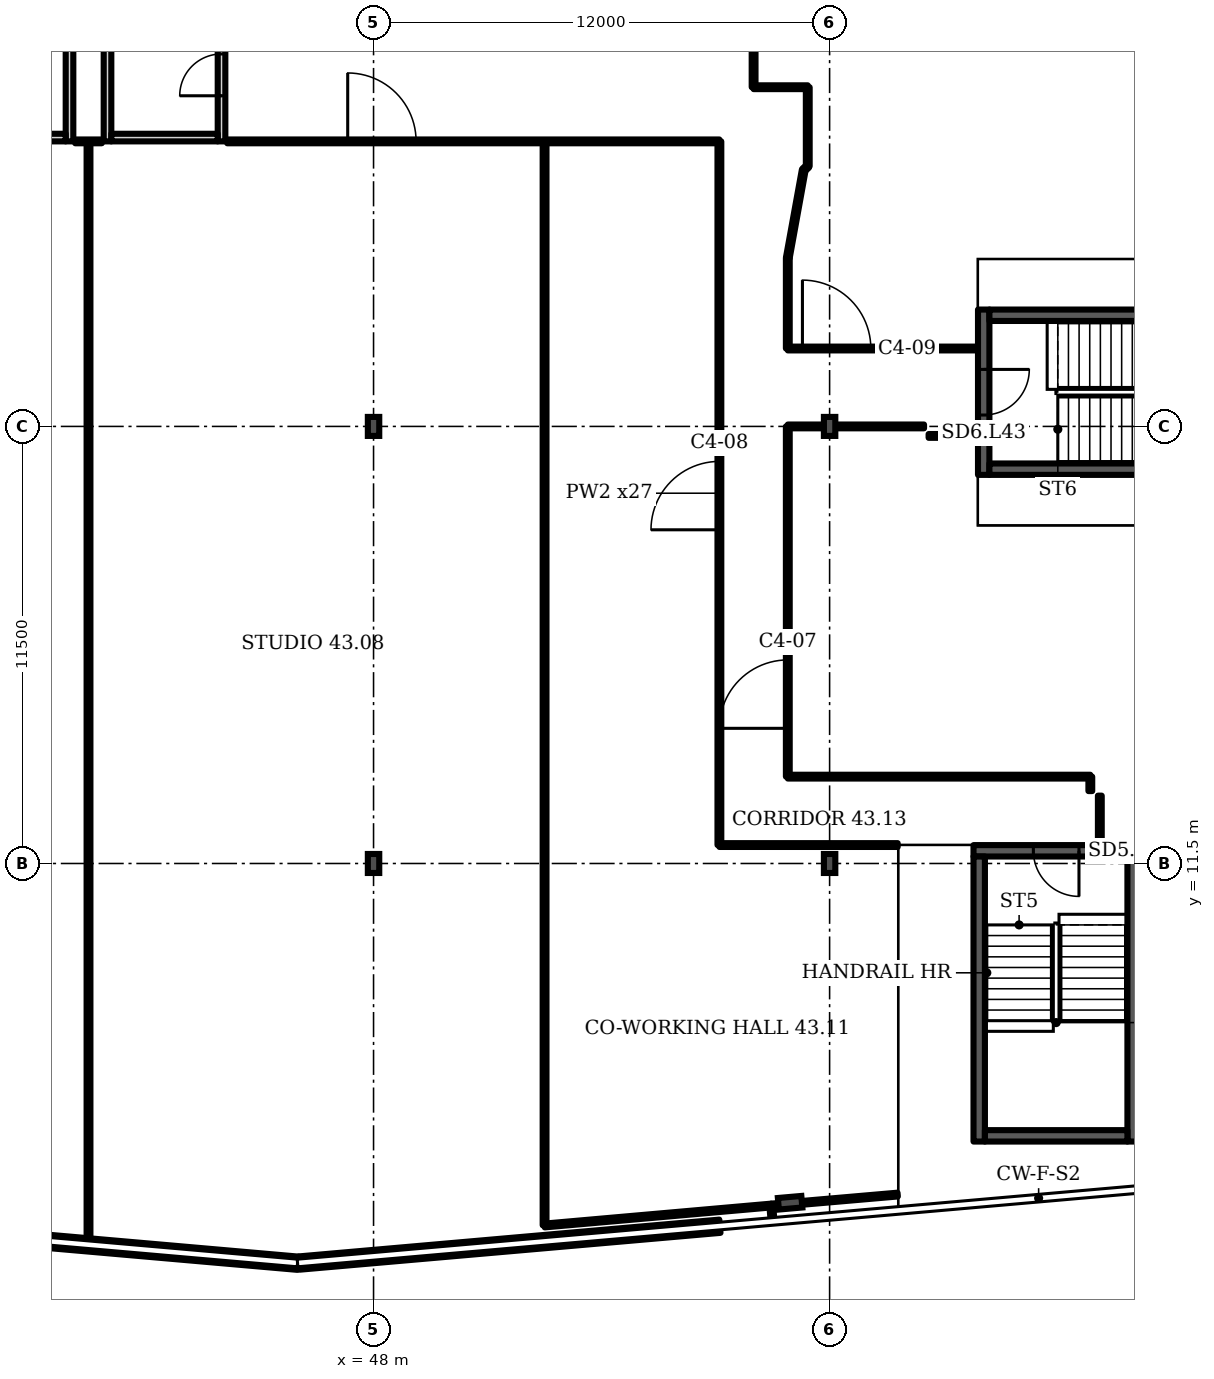
"""IFC4 building model, lengths in metres.
Left out: names, types, materials, properties, quantities, classifications, styles, units other than length and angle.
Written with IfcOpenShell. Run it as: python <this file> out.ifc"""

import sys

from ifc_helpers import new_model, si_unit, direction, frame, frame_2d, origin, origin_2d, place, context, subcontext, project, spatial, rectangle, i_section, extrude, element, fill, save


model = new_model("IFC4")
c1 = context("Model", 3, precision=1e-05, world=origin(), true_north=direction((0.0, 1.0)))
c2 = subcontext(c1, "Body", "Model", "MODEL_VIEW")
j1 = project(units=[si_unit("LENGTHUNIT", "METRE"), si_unit("PLANEANGLEUNIT", "RADIAN")], contexts=[c1])
p1 = place(None, origin())
s1 = spatial("IfcSite", under=j1, at=p1, CompositionType="ELEMENT")
p2 = place(p1, origin())
s2 = spatial("IfcBuilding", under=s1, at=p2, CompositionType="ELEMENT")
p3 = place(p2, frame((0.0, 0.0, 177.1)))
s3 = spatial("IfcBuildingStorey", under=s2, at=p3, CompositionType="ELEMENT", Elevation=177.1)
p4 = place(p3, frame((58.961, 2.573, 0.0), z_axis=(0.0, 0.0, 1.0), x_axis=(0.087156, -0.996198, 0.0)))
e1 = element("IfcColumn", 1, at=p4, inside=s3, PredefinedType="COLUMN", context=c2, shape_type="SweptSolid", body=[
    extrude(i_section(OverallWidth=0.305, OverallDepth=0.62, WebThickness=0.021, FlangeThickness=0.04, FilletRadius=0.027, at=origin_2d()), origin(), (0.0, 0.0, 1.0), 3.6),
])
for number, where, z_axis, x_axis in (
    (2, (48.0, 11.5, 0.0), (0.0, 0.0, 1.0), (1.0, 0.0, 0.0)),
    (3, (60.0, 11.5, 0.0), (0.0, 0.0, 1.0), (1.0, 0.0, 0.0)),
    (4, (48.0, 23.0, 0.0), (0.0, 0.0, 1.0), (1.0, 0.0, 0.0)),
    (5, (60.0, 23.0, 0.0), (0.0, 0.0, 1.0), (1.0, 0.0, 0.0)),
):
    element("IfcColumn", number, at=place(p3, frame(where, z_axis=z_axis, x_axis=x_axis)), inside=s3, PredefinedType="COLUMN", context=c2, shape_type="SweptSolid", body=[
        extrude(i_section(OverallWidth=0.3, OverallDepth=0.5, WebThickness=0.014, FlangeThickness=0.028, FilletRadius=0.027, at=origin_2d()), origin(), (0.0, 0.0, 1.0), 3.6),
    ])
p5 = place(p3, frame((35.03, 1.943, 0.0), z_axis=(0.0, 0.0, 1.0), x_axis=(0.996199, -0.08714, 0.0)))
e6 = element("IfcWall", 6, at=p5, inside=s3, PredefinedType="SOLIDWALL", context=c2, shape_type="SweptSolid", body=[
    extrude(rectangle(XDim=11.028, YDim=0.35, at=frame_2d((5.514, 0.0))), origin(), (0.0, 0.0, 1.0), 1.0),
])
p6 = place(p3, frame((46.045, 0.987, 0.0), z_axis=(0.0, 0.0, 1.0), x_axis=(0.996193, 0.087171, 0.0)))
e7 = element("IfcWall", 7, at=p6, inside=s3, PredefinedType="SOLIDWALL", context=c2, shape_type="SweptSolid", body=[
    extrude(rectangle(XDim=11.11, YDim=0.35, at=frame_2d((5.555, 0.0))), origin(), (0.0, 0.0, 1.0), 1.0),
])
p7 = place(p3, frame((40.0, 30.5, 0.0), z_axis=(0.0, 0.0, 1.0), x_axis=(0.0, 1.0, 0.0)))
e8 = element("IfcWall", 8, at=p7, inside=s3, PredefinedType="PARTITIONING", context=c2, shape_type="SweptSolid", body=[
    extrude(rectangle(XDim=3.5, YDim=0.2, at=frame_2d((1.75, 0.0))), origin(), (0.0, 0.0, 1.0), 3.2),
])
p8 = place(p3, frame((37.1, 30.6, 0.0), z_axis=(0.0, 0.0, 1.0), x_axis=(1.0, 0.0, 0.0)))
e9 = element("IfcWall", 9, at=p8, inside=s3, PredefinedType="PARTITIONING", context=c2, shape_type="SweptSolid", body=[
    extrude(rectangle(XDim=2.8, YDim=0.2, at=frame_2d((1.4, 0.0))), origin(), (0.0, 0.0, 1.0), 3.2),
])
p9 = place(p3, frame((41.0, 30.5, 0.0), z_axis=(0.0, 0.0, 1.0), x_axis=(0.0, 1.0, 0.0)))
e10 = element("IfcWall", 10, at=p9, inside=s3, PredefinedType="PARTITIONING", context=c2, shape_type="SweptSolid", body=[
    extrude(rectangle(XDim=3.5, YDim=0.2, at=frame_2d((1.75, 0.0))), origin(), (0.0, 0.0, 1.0), 3.2),
])
p10 = place(p3, frame((44.0, 30.5, 0.0), z_axis=(0.0, 0.0, 1.0), x_axis=(0.0, 1.0, 0.0)))
e11 = element("IfcWall", 11, at=p10, inside=s3, PredefinedType="PARTITIONING", context=c2, shape_type="SweptSolid", body=[
    extrude(rectangle(XDim=3.5, YDim=0.2, at=frame_2d((1.75, 0.0))), origin(), (0.0, 0.0, 1.0), 3.2),
])
p11 = place(p10, frame((1.2, 0.0, 0.0)))
e12 = element("IfcOpeningElement", 12, at=p11, cuts=e11, PredefinedType="OPENING", context=c2, shape_type="SweptSolid", body=[
    extrude(rectangle(XDim=1.1, YDim=2.1, at=frame_2d((0.55, 1.05))), frame((0.0, 0.11, 0.0), z_axis=(0.0, -1.0, 0.0), x_axis=(1.0, 0.0, 0.0)), (0.0, 0.0, 1.0), 0.22),
])
p12 = place(p3, frame((41.1, 30.6, 0.0), z_axis=(0.0, 0.0, 1.0), x_axis=(1.0, 0.0, 0.0)))
e13 = element("IfcWall", 13, at=p12, inside=s3, PredefinedType="PARTITIONING", context=c2, shape_type="SweptSolid", body=[
    extrude(rectangle(XDim=2.8, YDim=0.2, at=frame_2d((1.4, 0.0))), origin(), (0.0, 0.0, 1.0), 3.2),
])
p13 = place(p3, frame((63.786, 11.834, 0.0), z_axis=(0.0, 0.0, 1.0), x_axis=(1.0, 0.0, 0.0)))
e14 = element("IfcWall", 14, at=p13, inside=s3, PredefinedType="SHEAR", context=c2, shape_type="SweptSolid", body=[
    extrude(rectangle(XDim=4.35, YDim=0.3, at=frame_2d((2.175, 0.0))), origin(), (0.0, 0.0, 1.0), 3.2),
])
p14 = place(p13, frame((1.575, 0.0, 0.0)))
e15 = element("IfcOpeningElement", 15, at=p14, cuts=e14, PredefinedType="OPENING", context=c2, shape_type="SweptSolid", body=[
    extrude(rectangle(XDim=1.2, YDim=2.1, at=frame_2d((0.6, 1.05))), frame((0.0, 0.16, 0.0), z_axis=(0.0, -1.0, 0.0), x_axis=(1.0, 0.0, 0.0)), (0.0, 0.0, 1.0), 0.32),
])
p15 = place(p3, frame((64.055, 21.725, 0.0), z_axis=(0.0, 0.0, 1.0), x_axis=(0.0, 1.0, 0.0)))
e16 = element("IfcWall", 16, at=p15, inside=s3, PredefinedType="SHEAR", context=c2, shape_type="SweptSolid", body=[
    extrude(rectangle(XDim=4.35, YDim=0.3, at=frame_2d((2.175, 0.0))), origin(), (0.0, 0.0, 1.0), 3.2),
])
p16 = place(p15, frame((1.575, 0.0, 0.0)))
e17 = element("IfcOpeningElement", 17, at=p16, cuts=e16, PredefinedType="OPENING", context=c2, shape_type="SweptSolid", body=[
    extrude(rectangle(XDim=1.2, YDim=2.1, at=frame_2d((0.6, 1.05))), frame((0.0, 0.16, 0.0), z_axis=(0.0, -1.0, 0.0), x_axis=(1.0, 0.0, 0.0)), (0.0, 0.0, 1.0), 0.32),
])
p17 = place(p3, frame((40.5, 1.489, 0.0), z_axis=(0.0, 0.0, 1.0), x_axis=(0.0, 1.0, 0.0)))
e18 = element("IfcWall", 18, at=p17, inside=s3, PredefinedType="PARTITIONING", context=c2, shape_type="SweptSolid", body=[
    extrude(rectangle(XDim=29.011, YDim=0.1, at=frame_2d((14.505, 0.0))), origin(), (0.0, 0.0, 1.0), 3.2),
])
p18 = place(p3, frame((52.5, 1.98, 0.0), z_axis=(0.0, 0.0, 1.0), x_axis=(0.0, 1.0, 0.0)))
e19 = element("IfcWall", 19, at=p18, inside=s3, PredefinedType="PARTITIONING", context=c2, shape_type="SweptSolid", body=[
    extrude(rectangle(XDim=28.52, YDim=0.1, at=frame_2d((14.26, 0.0))), origin(), (0.0, 0.0, 1.0), 3.2),
])
p19 = place(p3, frame((52.5, 1.975, 0.0), z_axis=(0.0, 0.0, 1.0), x_axis=(0.99615, 0.087657, 0.0)))
e20 = element("IfcWall", 20, at=p19, inside=s3, PredefinedType="PARTITIONING", context=c2, shape_type="SweptSolid", body=[
    extrude(rectangle(XDim=5.988, YDim=0.1, at=frame_2d((2.994, 0.0))), origin(), (0.0, 0.0, 1.0), 3.2),
])
p20 = place(p3, frame((57.1, 11.985, 0.0), z_axis=(0.0, 0.0, 1.0), x_axis=(0.0, 1.0, 0.0)))
e21 = element("IfcWall", 21, at=p20, inside=s3, PredefinedType="PARTITIONING", context=c2, shape_type="SweptSolid", body=[
    extrude(rectangle(XDim=18.515, YDim=0.1, at=frame_2d((9.257, 0.0))), origin(), (0.0, 0.0, 1.0), 3.2),
])
p21 = place(p20, frame((8.295, 0.0, 0.0)))
e22 = element("IfcOpeningElement", 22, at=p21, cuts=e21, PredefinedType="OPENING", context=c2, shape_type="SweptSolid", body=[
    extrude(rectangle(XDim=1.8, YDim=2.1, at=frame_2d((0.9, 1.05))), frame((0.0, 0.06, 0.0), z_axis=(0.0, -1.0, 0.0), x_axis=(1.0, 0.0, 0.0)), (0.0, 0.0, 1.0), 0.12),
])
p22 = place(p3, frame((57.1, 11.985, 0.0), z_axis=(0.0, 0.0, 1.0), x_axis=(1.0, 0.0, 0.0)))
e23 = element("IfcWall", 23, at=p22, inside=s3, PredefinedType="PARTITIONING", context=c2, shape_type="SweptSolid", body=[
    extrude(rectangle(XDim=4.691, YDim=0.1, at=frame_2d((2.346, 0.0))), origin(), (0.0, 0.0, 1.0), 3.2),
])
p23 = place(p3, frame((58.0, 31.925, 0.0), z_axis=(0.0, 0.0, 1.0), x_axis=(0.0, 1.0, 0.0)))
e24 = element("IfcWall", 24, at=p23, inside=s3, PredefinedType="PARTITIONING", context=c2, shape_type="SweptSolid", body=[
    extrude(rectangle(XDim=2.055, YDim=0.1, at=frame_2d((1.027, 0.0))), origin(), (0.0, 0.0, 1.0), 3.2),
])
p24 = place(p3, frame((58.0, 31.925, 0.0), z_axis=(0.0, 0.0, 1.0), x_axis=(1.0, 0.0, 0.0)))
e25 = element("IfcWall", 25, at=p24, inside=s3, PredefinedType="PARTITIONING", context=c2, shape_type="SweptSolid", body=[
    extrude(rectangle(XDim=1.425, YDim=0.1, at=frame_2d((0.712, 0.0))), origin(), (0.0, 0.0, 1.0), 3.2),
])
p25 = place(p3, frame((58.465, 2.5, 0.0), z_axis=(0.0, 0.0, 1.0), x_axis=(0.996263, 0.086355, 0.0)))
e26 = element("IfcWall", 26, at=p25, inside=s3, PredefinedType="PARTITIONING", context=c2, shape_type="SweptSolid", body=[
    extrude(rectangle(XDim=3.339, YDim=0.1, at=frame_2d((1.669, 0.0))), origin(), (0.0, 0.0, 1.0), 2.58),
])
p26 = place(p3, frame((58.498, 2.102, 0.0), z_axis=(0.0, 0.0, 1.0), x_axis=(-0.083045, 0.996542, 0.0)))
e27 = element("IfcWall", 27, at=p26, inside=s3, PredefinedType="PARTITIONING", context=c2, shape_type="SweptSolid", body=[
    extrude(rectangle(XDim=0.4, YDim=0.1, at=frame_2d((0.2, 0.0))), origin(), (0.0, 0.0, 1.0), 3.2),
])
p27 = place(p3, frame((58.9, 13.785, 0.0), z_axis=(0.0, 0.0, 1.0), x_axis=(0.0, 1.0, 0.0)))
e28 = element("IfcWall", 28, at=p27, inside=s3, PredefinedType="PARTITIONING", context=c2, shape_type="SweptSolid", body=[
    extrude(rectangle(XDim=9.215, YDim=0.1, at=frame_2d((4.607, 0.0))), origin(), (0.0, 0.0, 1.0), 3.2),
])
p28 = place(p27, frame((1.271, 0.0, 0.0)))
e29 = element("IfcOpeningElement", 29, at=p28, cuts=e28, PredefinedType="OPENING", context=c2, shape_type="SweptSolid", body=[
    extrude(rectangle(XDim=1.8, YDim=2.1, at=frame_2d((0.9, 1.05))), frame((0.0, 0.06, 0.0), z_axis=(0.0, -1.0, 0.0), x_axis=(1.0, 0.0, 0.0)), (0.0, 0.0, 1.0), 0.12),
])
p29 = place(p3, frame((58.9, 13.785, 0.0), z_axis=(0.0, 0.0, 1.0), x_axis=(1.0, 0.0, 0.0)))
e30 = element("IfcWall", 30, at=p29, inside=s3, PredefinedType="PARTITIONING", context=c2, shape_type="SweptSolid", body=[
    extrude(rectangle(XDim=7.96, YDim=0.1, at=frame_2d((3.98, 0.0))), origin(), (0.0, 0.0, 1.0), 3.2),
])
p30 = place(p3, frame((58.9, 23.0, 0.0), z_axis=(0.0, 0.0, 1.0), x_axis=(1.0, 0.0, 0.0)))
e31 = element("IfcWall", 31, at=p30, inside=s3, PredefinedType="PARTITIONING", context=c2, shape_type="SweptSolid", body=[
    extrude(rectangle(XDim=3.585, YDim=0.1, at=frame_2d((1.792, 0.0))), origin(), (0.0, 0.0, 1.0), 3.2),
])
p31 = place(p3, frame((58.9, 25.05, 0.0), z_axis=(0.0, 0.0, 1.0), x_axis=(0.0, 1.0, 0.0)))
e32 = element("IfcWall", 32, at=p31, inside=s3, PredefinedType="PARTITIONING", context=c2, shape_type="SweptSolid", body=[
    extrude(rectangle(XDim=2.385, YDim=0.1, at=frame_2d((1.192, 0.0))), origin(), (0.0, 0.0, 1.0), 3.2),
])
p32 = place(p3, frame((58.9, 25.05, 0.0), z_axis=(0.0, 0.0, 1.0), x_axis=(1.0, 0.0, 0.0)))
e33 = element("IfcWall", 33, at=p32, inside=s3, PredefinedType="PARTITIONING", context=c2, shape_type="SweptSolid", body=[
    extrude(rectangle(XDim=4.985, YDim=0.1, at=frame_2d((2.492, 0.0))), origin(), (0.0, 0.0, 1.0), 3.2),
])
p33 = place(p32, frame((0.385, 0.0, 0.0)))
e34 = element("IfcOpeningElement", 34, at=p33, cuts=e33, PredefinedType="OPENING", context=c2, shape_type="SweptSolid", body=[
    extrude(rectangle(XDim=1.8, YDim=2.1, at=frame_2d((0.9, 1.05))), frame((0.0, 0.06, 0.0), z_axis=(0.0, -1.0, 0.0), x_axis=(1.0, 0.0, 0.0)), (0.0, 0.0, 1.0), 0.12),
])
p34 = place(p3, frame((58.9, 27.435, 0.0), z_axis=(0.0, 0.0, 1.0), x_axis=(0.178584, 0.983924, 0.0)))
e35 = element("IfcWall", 35, at=p34, inside=s3, PredefinedType="PARTITIONING", context=c2, shape_type="SweptSolid", body=[
    extrude(rectangle(XDim=2.353, YDim=0.1, at=frame_2d((1.176, 0.0))), origin(), (0.0, 0.0, 1.0), 3.2),
])
p35 = place(p3, frame((59.32, 29.75, 0.0), z_axis=(0.0, 0.0, 1.0), x_axis=(0.741581, 0.670872, 0.0)))
e36 = element("IfcWall", 36, at=p35, inside=s3, PredefinedType="PARTITIONING", context=c2, shape_type="SweptSolid", body=[
    extrude(rectangle(XDim=0.142, YDim=0.1, at=frame_2d((0.071, 0.0))), origin(), (0.0, 0.0, 1.0), 3.2),
])
p36 = place(p3, frame((59.425, 29.845, 0.0), z_axis=(0.0, 0.0, 1.0), x_axis=(0.0, 1.0, 0.0)))
e37 = element("IfcWall", 37, at=p36, inside=s3, PredefinedType="PARTITIONING", context=c2, shape_type="SweptSolid", body=[
    extrude(rectangle(XDim=2.08, YDim=0.1, at=frame_2d((1.04, 0.0))), origin(), (0.0, 0.0, 1.0), 3.2),
])
p37 = place(p3, frame((62.605, 22.75, 0.0), z_axis=(0.0, 0.0, 1.0), x_axis=(1.0, 0.0, 0.0)))
e38 = element("IfcWall", 38, at=p37, inside=s3, PredefinedType="PARTITIONING", context=c2, shape_type="SweptSolid", body=[
    extrude(rectangle(XDim=1.28, YDim=0.1, at=frame_2d((0.64, 0.0))), origin(), (0.0, 0.0, 1.0), 3.2),
])
p38 = place(p3, frame((66.86, 13.405, 0.0), z_axis=(0.0, 0.0, 1.0), x_axis=(0.0, 1.0, 0.0)))
e39 = element("IfcWall", 39, at=p38, inside=s3, PredefinedType="PARTITIONING", context=c2, shape_type="SweptSolid", body=[
    extrude(rectangle(XDim=0.38, YDim=0.1, at=frame_2d((0.19, 0.0))), origin(), (0.0, 0.0, 1.0), 3.2),
])
p39 = place(p3, frame((67.11, 12.004, 0.0), z_axis=(0.0, 0.0, 1.0), x_axis=(0.0, 1.0, 0.0)))
e40 = element("IfcWall", 40, at=p39, inside=s3, PredefinedType="PARTITIONING", context=c2, shape_type="SweptSolid", body=[
    extrude(rectangle(XDim=1.281, YDim=0.1, at=frame_2d((0.641, 0.0))), origin(), (0.0, 0.0, 1.0), 3.2),
])
p40 = place(p3, frame((40.15, 30.5, 0.0), z_axis=(0.0, 0.0, 1.0), x_axis=(1.0, 0.0, 0.0)))
e41 = element("IfcWall", 41, at=p40, inside=s3, PredefinedType="PARTITIONING", context=c2, shape_type="SweptSolid", body=[
    extrude(rectangle(XDim=0.7, YDim=0.1, at=frame_2d((0.35, 0.0))), origin(), (0.0, 0.0, 1.0), 3.2),
])
p41 = place(p3, frame((44.15, 30.5, 0.0), z_axis=(0.0, 0.0, 1.0), x_axis=(1.0, 0.0, 0.0)))
e42 = element("IfcWall", 42, at=p41, inside=s3, PredefinedType="PARTITIONING", context=c2, shape_type="SweptSolid", body=[
    extrude(rectangle(XDim=12.95, YDim=0.1, at=frame_2d((6.475, 0.0))), origin(), (0.0, 0.0, 1.0), 3.2),
])
p42 = place(p41, frame((3.17, 0.0, 0.0)))
e43 = element("IfcOpeningElement", 43, at=p42, cuts=e42, PredefinedType="OPENING", context=c2, shape_type="SweptSolid", body=[
    extrude(rectangle(XDim=1.8, YDim=2.1, at=frame_2d((0.9, 1.05))), frame((0.0, 0.06, 0.0), z_axis=(0.0, -1.0, 0.0), x_axis=(1.0, 0.0, 0.0)), (0.0, 0.0, 1.0), 0.12),
])
for number, where, z_axis, x_axis in (
    (44, (63.936, 4.184, 0.0), (0.0, 0.0, 1.0), (0.0, 1.0, 0.0)),
    (45, (67.986, 4.184, 0.0), (0.0, 0.0, 1.0), (0.0, 1.0, 0.0)),
):
    element("IfcWall", number, at=place(p3, frame(where, z_axis=z_axis, x_axis=x_axis)), inside=s3, PredefinedType="SHEAR", context=c2, shape_type="SweptSolid", body=[
        extrude(rectangle(XDim=7.5, YDim=0.3, at=frame_2d((3.75, 0.0))), origin(), (0.0, 0.0, 1.0), 3.2),
    ])
p43 = place(p3, frame((64.086, 4.334, 0.0), z_axis=(0.0, 0.0, 1.0), x_axis=(1.0, 0.0, 0.0)))
e46 = element("IfcWall", 46, at=p43, inside=s3, PredefinedType="SHEAR", context=c2, shape_type="SweptSolid", body=[
    extrude(rectangle(XDim=3.75, YDim=0.3, at=frame_2d((1.875, 0.0))), origin(), (0.0, 0.0, 1.0), 3.2),
])
for number, where, z_axis, x_axis in (
    (47, (64.205, 21.875, 0.0), (0.0, 0.0, 1.0), (1.0, 0.0, 0.0)),
    (48, (64.205, 25.925, 0.0), (0.0, 0.0, 1.0), (1.0, 0.0, 0.0)),
):
    element("IfcWall", number, at=place(p3, frame(where, z_axis=z_axis, x_axis=x_axis)), inside=s3, PredefinedType="SHEAR", context=c2, shape_type="SweptSolid", body=[
        extrude(rectangle(XDim=7.5, YDim=0.3, at=frame_2d((3.75, 0.0))), origin(), (0.0, 0.0, 1.0), 3.2),
    ])
p44 = place(p11, origin())
e49 = element("IfcDoor", 49, at=p44, inside=s3, OperationType="SINGLE_SWING_LEFT", PredefinedType="DOOR", context=c2, shape_type="SweptSolid", body=[
    extrude(rectangle(XDim=1.1, YDim=2.1, at=frame_2d((0.55, 1.05))), frame((0.0, 0.025, 0.0), z_axis=(0.0, -1.0, 0.0), x_axis=(1.0, 0.0, 0.0)), (0.0, 0.0, 1.0), 0.05),
])
fill(e12, e49)
p45 = place(p14, origin())
e50 = element("IfcDoor", 50, at=p45, inside=s3, OperationType="SINGLE_SWING_RIGHT", PredefinedType="DOOR", context=c2, shape_type="SweptSolid", body=[
    extrude(rectangle(XDim=1.2, YDim=2.1, at=frame_2d((0.6, 1.05))), frame((0.0, 0.025, 0.0), z_axis=(0.0, -1.0, 0.0), x_axis=(1.0, 0.0, 0.0)), (0.0, 0.0, 1.0), 0.05),
])
fill(e15, e50)
p46 = place(p16, origin())
e51 = element("IfcDoor", 51, at=p46, inside=s3, OperationType="SINGLE_SWING_RIGHT", PredefinedType="DOOR", context=c2, shape_type="SweptSolid", body=[
    extrude(rectangle(XDim=1.2, YDim=2.1, at=frame_2d((0.6, 1.05))), frame((0.0, 0.025, 0.0), z_axis=(0.0, -1.0, 0.0), x_axis=(1.0, 0.0, 0.0)), (0.0, 0.0, 1.0), 0.05),
])
fill(e17, e51)
p47 = place(p28, origin())
e52 = element("IfcDoor", 52, at=p47, inside=s3, OperationType="DOUBLE_DOOR_SINGLE_SWING", PredefinedType="DOOR", context=c2, shape_type="SweptSolid", body=[
    extrude(rectangle(XDim=1.8, YDim=2.1, at=frame_2d((0.9, 1.05))), frame((0.0, 0.025, 0.0), z_axis=(0.0, -1.0, 0.0), x_axis=(1.0, 0.0, 0.0)), (0.0, 0.0, 1.0), 0.05),
])
fill(e29, e52)
p48 = place(p21, origin())
e53 = element("IfcDoor", 53, at=p48, inside=s3, OperationType="DOUBLE_DOOR_SINGLE_SWING", PredefinedType="DOOR", context=c2, shape_type="SweptSolid", body=[
    extrude(rectangle(XDim=1.8, YDim=2.1, at=frame_2d((0.9, 1.05))), frame((0.0, 0.025, 0.0), z_axis=(0.0, -1.0, 0.0), x_axis=(1.0, 0.0, 0.0)), (0.0, 0.0, 1.0), 0.05),
])
fill(e22, e53)
p49 = place(p33, origin())
e54 = element("IfcDoor", 54, at=p49, inside=s3, OperationType="DOUBLE_DOOR_SINGLE_SWING", PredefinedType="DOOR", context=c2, shape_type="SweptSolid", body=[
    extrude(rectangle(XDim=1.8, YDim=2.1, at=frame_2d((0.9, 1.05))), frame((0.0, 0.025, 0.0), z_axis=(0.0, -1.0, 0.0), x_axis=(1.0, 0.0, 0.0)), (0.0, 0.0, 1.0), 0.05),
])
fill(e34, e54)
p50 = place(p42, origin())
e55 = element("IfcDoor", 55, at=p50, inside=s3, OperationType="DOUBLE_DOOR_SINGLE_SWING", PredefinedType="DOOR", context=c2, shape_type="SweptSolid", body=[
    extrude(rectangle(XDim=1.8, YDim=2.1, at=frame_2d((0.9, 1.05))), frame((0.0, 0.025, 0.0), z_axis=(0.0, -1.0, 0.0), x_axis=(1.0, 0.0, 0.0)), (0.0, 0.0, 1.0), 0.05),
])
fill(e43, e55)
save(model, sys.argv[1])
